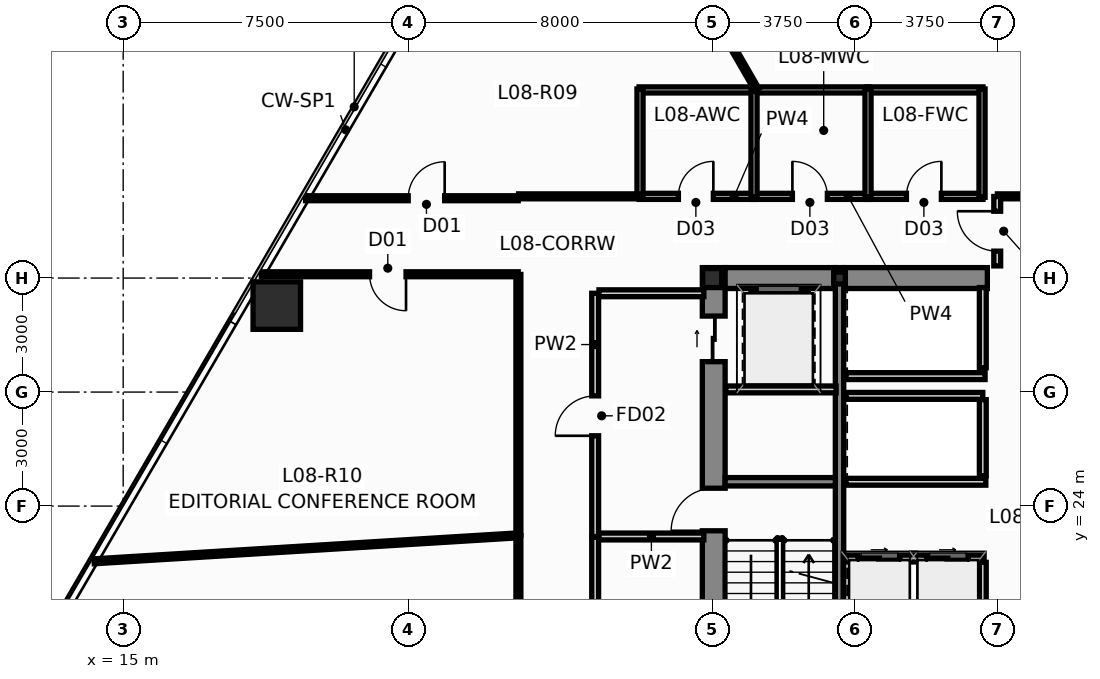
"""IFC4 building model, lengths in metres.
Left out: names, types, materials, properties, quantities, classifications, styles, units other than length and angle.
Written with IfcOpenShell. Run it as: python <this file> out.ifc"""

import sys

from ifc_helpers import new_model, si_unit, direction, frame, frame_2d, origin, origin_2d, place, context, subcontext, project, spatial, rectangle, hollow_rectangle, i_section, extrude, source, transform, mapped, element, fill, save


model = new_model("IFC4")
c1 = context("Model", 3, precision=1e-05, world=origin(), true_north=direction((0.0, 1.0)))
c2 = subcontext(c1, "Body", "Model", "MODEL_VIEW")
j1 = project(units=[si_unit("LENGTHUNIT", "METRE"), si_unit("PLANEANGLEUNIT", "RADIAN")], contexts=[c1])
p1 = place(None, origin())
s1 = spatial("IfcSite", under=j1, at=p1, CompositionType="ELEMENT")
p2 = place(p1, origin())
s2 = spatial("IfcBuilding", under=s1, at=p2, CompositionType="ELEMENT")
p3 = place(p2, frame((0.0, 0.0, 34.9)))
s3 = spatial("IfcBuildingStorey", under=s2, at=p3, CompositionType="ELEMENT", Elevation=34.9)
m1 = source(origin(), c2, "Body", "SweptSolid", [
    extrude(i_section(OverallWidth=0.5, OverallDepth=0.5, WebThickness=0.028, FlangeThickness=0.04, at=origin_2d()), origin(), (0.0, 0.0, 1.0), 3.65),
])
p4 = place(p3, frame((30.5, 30.0, 0.0), z_axis=(0.0, 0.0, 1.0), x_axis=(1.0, 0.0, 0.0)))
e1 = element("IfcColumn", 1, at=p4, inside=s3, PredefinedType="COLUMN", context=c2, shape_type="MappedRepresentation", body=[
    mapped(m1, transform((0.0, 0.0, 0.0), scale=1.0)),
])
m2 = source(origin(), c2, "Body", "SweptSolid", [
    extrude(i_section(OverallWidth=0.307, OverallDepth=0.315, WebThickness=0.012, FlangeThickness=0.019, at=origin_2d()), origin(), (0.0, 0.0, 1.0), 3.65),
])
p5 = place(p3, frame((33.85, 30.0, 0.0), z_axis=(0.0, 0.0, 1.0), x_axis=(1.0, 0.0, 0.0)))
e2 = element("IfcColumn", 2, at=p5, inside=s3, PredefinedType="COLUMN", context=c2, shape_type="MappedRepresentation", body=[
    mapped(m2, transform((0.0, 0.0, 0.0), scale=1.0)),
])
p6 = place(p3, frame((30.54, 16.85, 0.0), z_axis=(0.0, 0.0, 1.0), x_axis=(0.0, 1.0, 0.0)))
e3 = element("IfcWall", 3, at=p6, inside=s3, PredefinedType="SHEAR", context=c2, shape_type="SweptSolid", body=[
    extrude(rectangle(XDim=13.425, YDim=0.6, at=frame_2d((6.712, 0.0))), origin(), (0.0, 0.0, 1.0), 3.65),
])
p7 = place(p6, frame((6.5, 0.0, 0.0)))
e4 = element("IfcOpeningElement", 4, at=p7, cuts=e3, PredefinedType="OPENING", context=c2, shape_type="SweptSolid", body=[
    extrude(rectangle(XDim=1.12, YDim=2.15, at=frame_2d((0.56, 1.075))), frame((0.0, 0.312, 0.0), z_axis=(0.0, -1.0, 0.0), x_axis=(1.0, 0.0, 0.0)), (0.0, 0.0, 1.0), 0.624),
])
p8 = place(p6, frame((10.95, 0.0, 0.0)))
e5 = element("IfcOpeningElement", 5, at=p8, cuts=e3, PredefinedType="OPENING", context=c2, shape_type="SweptSolid", body=[
    extrude(rectangle(XDim=1.2, YDim=2.2, at=frame_2d((0.6, 1.1))), frame((0.0, 0.312, 0.0), z_axis=(0.0, -1.0, 0.0), x_axis=(1.0, 0.0, 0.0)), (0.0, 0.0, 1.0), 0.624),
])
p9 = place(p3, frame((30.84, 30.0, 0.0), z_axis=(0.0, 0.0, 1.0), x_axis=(1.0, 0.0, 0.0)))
e6 = element("IfcWall", 6, at=p9, inside=s3, PredefinedType="SHEAR", context=c2, shape_type="SweptSolid", body=[
    extrude(rectangle(XDim=2.9, YDim=0.55, at=frame_2d((1.45, 0.0))), origin(), (0.0, 0.0, 1.0), 3.65),
])
p10 = place(p3, frame((33.96, 30.0, 0.0), z_axis=(0.0, 0.0, 1.0), x_axis=(1.0, 0.0, 0.0)))
e7 = element("IfcWall", 7, at=p10, inside=s3, PredefinedType="SHEAR", context=c2, shape_type="SweptSolid", body=[
    extrude(rectangle(XDim=3.78, YDim=0.55, at=frame_2d((1.89, 0.0))), origin(), (0.0, 0.0, 1.0), 3.65),
])
p11 = place(p3, frame((33.85, 16.85, 0.0), z_axis=(0.0, 0.0, 1.0), x_axis=(0.0, 1.0, 0.0)))
e8 = element("IfcWall", 8, at=p11, inside=s3, PredefinedType="SHEAR", context=c2, shape_type="SweptSolid", body=[
    extrude(rectangle(XDim=13.425, YDim=0.22, at=frame_2d((6.712, 0.0))), origin(), (0.0, 0.0, 1.0), 3.65),
])
p12 = place(p3, frame((30.84, 24.64, 0.0), z_axis=(0.0, 0.0, 1.0), x_axis=(1.0, 0.0, 0.0)))
e9 = element("IfcWall", 9, at=p12, inside=s3, PredefinedType="SHEAR", context=c2, shape_type="SweptSolid", body=[
    extrude(rectangle(XDim=2.9, YDim=0.22, at=frame_2d((1.45, 0.0))), origin(), (0.0, 0.0, 1.0), 3.65),
])
m3 = source(origin(), c2, "Body", "SweptSolid", [
    extrude(hollow_rectangle(XDim=1.25, YDim=1.25, WallThickness=0.07, at=origin_2d()), origin(), (0.0, 0.0, 1.0), 3.651),
])
p13 = place(p3, frame((19.042, 29.275, 0.0), z_axis=(0.014845459728, -0.013775516685, 0.9997949027), x_axis=(0.68019775991, 0.733028653883, 0.0)))
e10 = element("IfcColumn", 10, at=p13, inside=s3, PredefinedType="COLUMN", context=c2, shape_type="MappedRepresentation", body=[
    mapped(m3, transform((0.0, 0.0, 0.0), scale=1.0)),
])
m4 = source(origin(), c2, "Body", "SweptSolid", [
    extrude(hollow_rectangle(XDim=1.25, YDim=1.25, WallThickness=0.07, at=origin_2d()), origin(), (0.0, 0.0, 1.0), 3.651),
])
p14 = place(p3, frame((14.132, 20.771, 0.0), z_axis=(0.010431098089, -0.021530856313, 0.999713766245), x_axis=(0.899947055326, 0.435999194506, 0.0)))
e11 = element("IfcColumn", 11, at=p14, inside=s3, PredefinedType="COLUMN", context=c2, shape_type="MappedRepresentation", body=[
    mapped(m4, transform((0.0, 0.0, 0.0), scale=1.0)),
])
p15 = place(p3, frame((34.02, 22.62, 0.0), z_axis=(0.0, 0.0, 1.0), x_axis=(1.0, 0.0, 0.0)))
e12 = element("IfcWall", 12, at=p15, inside=s3, PredefinedType="PARTITIONING", context=c2, shape_type="SweptSolid", body=[
    extrude(rectangle(XDim=3.6, YDim=0.18, at=frame_2d((1.8, 0.0))), origin(), (0.0, 0.0, 1.0), 3.4),
])
p16 = place(p15, frame((0.32, 0.0, 0.0)))
e13 = element("IfcOpeningElement", 13, at=p16, cuts=e12, PredefinedType="OPENING", context=c2, shape_type="SweptSolid", body=[
    extrude(rectangle(XDim=1.1, YDim=2.2, at=frame_2d((0.55, 1.1))), frame((0.0, 0.102, 0.0), z_axis=(0.0, -1.0, 0.0), x_axis=(1.0, 0.0, 0.0)), (0.0, 0.0, 1.0), 0.204),
])
p17 = place(p15, frame((2.12, 0.0, 0.0)))
e14 = element("IfcOpeningElement", 14, at=p17, cuts=e12, PredefinedType="OPENING", context=c2, shape_type="SweptSolid", body=[
    extrude(rectangle(XDim=1.1, YDim=2.2, at=frame_2d((0.55, 1.1))), frame((0.0, 0.102, 0.0), z_axis=(0.0, -1.0, 0.0), x_axis=(1.0, 0.0, 0.0)), (0.0, 0.0, 1.0), 0.204),
])
p18 = place(p3, frame((37.62, 20.52, 0.0), z_axis=(0.0, 0.0, 1.0), x_axis=(0.0, 1.0, 0.0)))
e15 = element("IfcWall", 15, at=p18, inside=s3, PredefinedType="PARTITIONING", context=c2, shape_type="SweptSolid", body=[
    extrude(rectangle(XDim=2.0, YDim=0.18, at=frame_2d((1.0, 0.0))), origin(), (0.0, 0.0, 1.0), 3.4),
])
p19 = place(p3, frame((34.02, 26.9, 0.0), z_axis=(0.0, 0.0, 1.0), x_axis=(1.0, 0.0, 0.0)))
e16 = element("IfcWall", 16, at=p19, inside=s3, PredefinedType="PARTITIONING", context=c2, shape_type="SweptSolid", body=[
    extrude(rectangle(XDim=3.6, YDim=0.18, at=frame_2d((1.8, 0.0))), origin(), (0.0, 0.0, 1.0), 3.4),
])
p20 = place(p3, frame((37.62, 24.8, 0.0), z_axis=(0.0, 0.0, 1.0), x_axis=(0.0, 1.0, 0.0)))
e17 = element("IfcWall", 17, at=p20, inside=s3, PredefinedType="PARTITIONING", context=c2, shape_type="SweptSolid", body=[
    extrude(rectangle(XDim=2.0, YDim=0.18, at=frame_2d((1.0, 0.0))), origin(), (0.0, 0.0, 1.0), 3.4),
])
p21 = place(p3, frame((34.02, 24.64, 0.0), z_axis=(0.0, 0.0, 1.0), x_axis=(1.0, 0.0, 0.0)))
e18 = element("IfcWall", 18, at=p21, inside=s3, PredefinedType="PARTITIONING", context=c2, shape_type="SweptSolid", body=[
    extrude(rectangle(XDim=3.68, YDim=0.18, at=frame_2d((1.84, 0.0))), origin(), (0.0, 0.0, 1.0), 3.4),
])
p22 = place(p3, frame((34.02, 27.42, 0.0), z_axis=(0.0, 0.0, 1.0), x_axis=(1.0, 0.0, 0.0)))
e19 = element("IfcWall", 19, at=p22, inside=s3, PredefinedType="PARTITIONING", context=c2, shape_type="SweptSolid", body=[
    extrude(rectangle(XDim=3.66, YDim=0.18, at=frame_2d((1.83, 0.0))), origin(), (0.0, 0.0, 1.0), 3.4),
])
p23 = place(p3, frame((37.62, 27.64, 0.0), z_axis=(0.0, 0.0, 1.0), x_axis=(0.0, 1.0, 0.0)))
e20 = element("IfcWall", 20, at=p23, inside=s3, PredefinedType="PARTITIONING", context=c2, shape_type="SweptSolid", body=[
    extrude(rectangle(XDim=2.11, YDim=0.18, at=frame_2d((1.055, 0.0))), origin(), (0.0, 0.0, 1.0), 3.4),
])
p24 = place(p3, frame((27.42, 23.2, 0.0), z_axis=(0.0, 0.0, 1.0), x_axis=(0.0, 1.0, 0.0)))
e21 = element("IfcWall", 21, at=p24, inside=s3, PredefinedType="PARTITIONING", context=c2, shape_type="SweptSolid", body=[
    extrude(rectangle(XDim=6.4, YDim=0.18, at=frame_2d((3.2, 0.0))), origin(), (0.0, 0.0, 1.0), 3.4),
])
p25 = place(p24, frame((2.65, 0.0, 0.0)))
e22 = element("IfcOpeningElement", 22, at=p25, cuts=e21, PredefinedType="OPENING", context=c2, shape_type="SweptSolid", body=[
    extrude(rectangle(XDim=1.05, YDim=2.15, at=frame_2d((0.525, 1.075))), frame((0.0, 0.102, 0.0), z_axis=(0.0, -1.0, 0.0), x_axis=(1.0, 0.0, 0.0)), (0.0, 0.0, 1.0), 0.204),
])
p26 = place(p3, frame((27.52, 23.2, 0.0), z_axis=(0.0, 0.0, 1.0), x_axis=(1.0, 0.0, 0.0)))
e23 = element("IfcWall", 23, at=p26, inside=s3, PredefinedType="PARTITIONING", context=c2, shape_type="SweptSolid", body=[
    extrude(rectangle(XDim=2.76, YDim=0.18, at=frame_2d((1.38, 0.0))), origin(), (0.0, 0.0, 1.0), 3.4),
])
p27 = place(p3, frame((27.52, 29.6, 0.0), z_axis=(0.0, 0.0, 1.0), x_axis=(1.0, 0.0, 0.0)))
e24 = element("IfcWall", 24, at=p27, inside=s3, PredefinedType="PARTITIONING", context=c2, shape_type="SweptSolid", body=[
    extrude(rectangle(XDim=2.76, YDim=0.18, at=frame_2d((1.38, 0.0))), origin(), (0.0, 0.0, 1.0), 2.783),
])
p28 = place(p3, frame((30.86, 27.07, 0.0), z_axis=(0.0, 0.0, 1.0), x_axis=(1.0, 0.0, 0.0)))
e25 = element("IfcWall", 25, at=p28, inside=s3, PredefinedType="PARTITIONING", context=c2, shape_type="SweptSolid", body=[
    extrude(rectangle(XDim=2.9, YDim=0.18, at=frame_2d((1.45, 0.0))), origin(), (0.0, 0.0, 1.0), 3.4),
])
p29 = place(p3, frame((27.42, 17.15, 0.0), z_axis=(0.0, 0.0, 1.0), x_axis=(0.0, 1.0, 0.0)))
e26 = element("IfcWall", 26, at=p29, inside=s3, PredefinedType="PARTITIONING", context=c2, shape_type="SweptSolid", body=[
    extrude(rectangle(XDim=6.03, YDim=0.18, at=frame_2d((3.015, 0.0))), origin(), (0.0, 0.0, 1.0), 3.027),
])
p30 = place(p29, frame((2.45, 0.0, 0.0)))
e27 = element("IfcOpeningElement", 27, at=p30, cuts=e26, PredefinedType="OPENING", context=c2, shape_type="SweptSolid", body=[
    extrude(rectangle(XDim=1.05, YDim=2.15, at=frame_2d((0.525, 1.075))), frame((0.0, 0.102, 0.0), z_axis=(0.0, -1.0, 0.0), x_axis=(1.0, 0.0, 0.0)), (0.0, 0.0, 1.0), 0.204),
])
p31 = place(p3, frame((28.575, 32.15, 0.0), z_axis=(0.0, 0.0, 1.0), x_axis=(1.0, 0.0, 0.0)))
e28 = element("IfcWall", 28, at=p31, inside=s3, PredefinedType="PLUMBINGWALL", context=c2, shape_type="SweptSolid", body=[
    extrude(rectangle(XDim=3.05, YDim=0.16, at=frame_2d((1.525, 0.0))), origin(), (0.0, 0.0, 1.0), 3.4),
])
p32 = place(p31, frame((1.035, 0.0, 0.0)))
e29 = element("IfcOpeningElement", 29, at=p32, cuts=e28, PredefinedType="OPENING", context=c2, shape_type="SweptSolid", body=[
    extrude(rectangle(XDim=0.92, YDim=2.1, at=frame_2d((0.46, 1.05))), frame((0.0, 0.092, 0.0), z_axis=(0.0, -1.0, 0.0), x_axis=(1.0, 0.0, 0.0)), (0.0, 0.0, 1.0), 0.184),
])
p33 = place(p3, frame((31.575, 32.15, 0.0), z_axis=(0.0, 0.0, 1.0), x_axis=(1.0, 0.0, 0.0)))
e30 = element("IfcWall", 30, at=p33, inside=s3, PredefinedType="PLUMBINGWALL", context=c2, shape_type="SweptSolid", body=[
    extrude(rectangle(XDim=3.05, YDim=0.16, at=frame_2d((1.525, 0.0))), origin(), (0.0, 0.0, 1.0), 3.4),
])
p34 = place(p33, frame((1.035, 0.0, 0.0)))
e31 = element("IfcOpeningElement", 31, at=p34, cuts=e30, PredefinedType="OPENING", context=c2, shape_type="SweptSolid", body=[
    extrude(rectangle(XDim=0.92, YDim=2.1, at=frame_2d((0.46, 1.05))), frame((0.0, 0.092, 0.0), z_axis=(0.0, -1.0, 0.0), x_axis=(1.0, 0.0, 0.0)), (0.0, 0.0, 1.0), 0.184),
])
p35 = place(p3, frame((34.575, 32.15, 0.0), z_axis=(0.0, 0.0, 1.0), x_axis=(1.0, 0.0, 0.0)))
e32 = element("IfcWall", 32, at=p35, inside=s3, PredefinedType="PLUMBINGWALL", context=c2, shape_type="SweptSolid", body=[
    extrude(rectangle(XDim=3.05, YDim=0.16, at=frame_2d((1.525, 0.0))), origin(), (0.0, 0.0, 1.0), 3.4),
])
p36 = place(p35, frame((1.035, 0.0, 0.0)))
e33 = element("IfcOpeningElement", 33, at=p36, cuts=e32, PredefinedType="OPENING", context=c2, shape_type="SweptSolid", body=[
    extrude(rectangle(XDim=0.92, YDim=2.1, at=frame_2d((0.46, 1.05))), frame((0.0, 0.092, 0.0), z_axis=(0.0, -1.0, 0.0), x_axis=(1.0, 0.0, 0.0)), (0.0, 0.0, 1.0), 0.184),
])
for number, where, z_axis, x_axis in (
    (34, (28.575, 34.95, 0.0), (0.0, 0.0, 1.0), (1.0, 0.0, 0.0)),
    (35, (37.625, 34.95, 0.0), (0.0, 0.0, 1.0), (-1.0, 0.0, 0.0)),
):
    element("IfcWall", number, at=place(p3, frame(where, z_axis=z_axis, x_axis=x_axis)), inside=s3, PredefinedType="PLUMBINGWALL", context=c2, shape_type="SweptSolid", body=[
        extrude(rectangle(XDim=3.05, YDim=0.16, at=frame_2d((1.525, 0.0))), origin(), (0.0, 0.0, 1.0), 3.027),
    ])
p37 = place(p3, frame((31.655, 34.95, 0.0), z_axis=(0.0, 0.0, 1.0), x_axis=(1.0, 0.0, 0.0)))
e36 = element("IfcWall", 36, at=p37, inside=s3, PredefinedType="PLUMBINGWALL", context=c2, shape_type="SweptSolid", body=[
    extrude(rectangle(XDim=2.97, YDim=0.16, at=frame_2d((1.485, 0.0))), origin(), (0.0, 0.0, 1.0), 3.027),
])
for number, where, z_axis, x_axis in (
    (37, (31.6, 32.125, 0.0), (0.0, 0.0, 1.0), (0.0, 1.0, 0.0)),
    (38, (28.6, 32.125, 0.0), (0.0, 0.0, 1.0), (0.0, 1.0, 0.0)),
    (39, (34.6, 32.125, 0.0), (0.0, 0.0, 1.0), (0.0, 1.0, 0.0)),
    (40, (37.6, 32.125, 0.0), (0.0, 0.0, 1.0), (0.0, 1.0, 0.0)),
):
    element("IfcWall", number, at=place(p3, frame(where, z_axis=z_axis, x_axis=x_axis)), inside=s3, PredefinedType="PLUMBINGWALL", context=c2, shape_type="SweptSolid", body=[
        extrude(rectangle(XDim=2.85, YDim=0.16, at=frame_2d((1.425, 0.0))), origin(), (0.0, 0.0, 1.0), 3.4),
    ])
p38 = place(p3, frame((14.236, 22.547, 0.0), z_axis=(0.0, 0.0, 1.0), x_axis=(0.998132881606, 0.061079871132, 0.0)))
e41 = element("IfcWall", 41, at=p38, inside=s3, PredefinedType="PARTITIONING", context=c2, shape_type="SweptSolid", body=[
    extrude(rectangle(XDim=11.18, YDim=0.13, at=frame_2d((5.59, 0.0))), origin(), (0.0, 0.0, 1.0), 3.4),
])
p39 = place(p3, frame((26.592, 43.76, 0.0), z_axis=(0.0, 0.0, 1.0), x_axis=(0.500061190887, -0.865990072327, 0.0)))
e42 = element("IfcWall", 42, at=p39, inside=s3, PredefinedType="PARTITIONING", context=c2, shape_type="SweptSolid", body=[
    extrude(rectangle(XDim=10.169, YDim=0.13, at=frame_2d((5.084, 0.0))), origin(), (0.0, 0.0, 1.0), 3.4),
])
p40 = place(p3, frame((25.4, 23.235, 0.0), z_axis=(0.0, 0.0, 1.0), x_axis=(0.0, 1.0, 0.0)))
e43 = element("IfcWall", 43, at=p40, inside=s3, PredefinedType="PARTITIONING", context=c2, shape_type="SweptSolid", body=[
    extrude(rectangle(XDim=6.86, YDim=0.13, at=frame_2d((3.43, 0.0))), origin(), (0.0, 0.0, 1.0), 3.027),
])
p41 = place(p3, frame((25.395, 30.1, 0.0), z_axis=(0.0, 0.0, 1.0), x_axis=(-1.0, 0.0, 0.0)))
e44 = element("IfcWall", 44, at=p41, inside=s3, PredefinedType="PARTITIONING", context=c2, shape_type="SweptSolid", body=[
    extrude(rectangle(XDim=6.76, YDim=0.13, at=frame_2d((3.38, 0.0))), origin(), (0.0, 0.0, 1.0), 2.783),
])
p42 = place(p41, frame((2.952, 0.0, 0.0)))
e45 = element("IfcOpeningElement", 45, at=p42, cuts=e44, PredefinedType="OPENING", context=c2, shape_type="SweptSolid", body=[
    extrude(rectangle(XDim=0.96, YDim=2.15, at=frame_2d((0.48, 1.075))), frame((0.0, 0.077, 0.0), z_axis=(0.0, -1.0, 0.0), x_axis=(1.0, 0.0, 0.0)), (0.0, 0.0, 1.0), 0.154),
])
p43 = place(p3, frame((25.4, 17.105, 0.0), z_axis=(0.0, 0.0, 1.0), x_axis=(0.0, 1.0, 0.0)))
e46 = element("IfcWall", 46, at=p43, inside=s3, PredefinedType="PARTITIONING", context=c2, shape_type="SweptSolid", body=[
    extrude(rectangle(XDim=6.12, YDim=0.13, at=frame_2d((3.06, 0.0))), origin(), (0.0, 0.0, 1.0), 3.027),
])
p44 = place(p3, frame((19.8, 32.1, 0.0), z_axis=(0.0, 0.0, 1.0), x_axis=(1.0, 0.0, 0.0)))
e47 = element("IfcWall", 47, at=p44, inside=s3, PredefinedType="PARTITIONING", context=c2, shape_type="SweptSolid", body=[
    extrude(rectangle(XDim=5.595, YDim=0.13, at=frame_2d((2.797, 0.0))), origin(), (0.0, 0.0, 1.0), 3.4),
])
p45 = place(p44, frame((2.7, 0.0, 0.0)))
e48 = element("IfcOpeningElement", 48, at=p45, cuts=e47, PredefinedType="OPENING", context=c2, shape_type="SweptSolid", body=[
    extrude(rectangle(XDim=0.96, YDim=2.15, at=frame_2d((0.48, 1.075))), frame((0.0, 0.077, 0.0), z_axis=(0.0, -1.0, 0.0), x_axis=(1.0, 0.0, 0.0)), (0.0, 0.0, 1.0), 0.154),
])
p46 = place(p3, frame((38.005, 32.15, 0.0), z_axis=(0.0, 0.0, 1.0), x_axis=(1.0, 0.0, 0.0)))
e49 = element("IfcWall", 49, at=p46, inside=s3, PredefinedType="PARTITIONING", context=c2, shape_type="SweptSolid", body=[
    extrude(rectangle(XDim=4.05, YDim=0.13, at=frame_2d((2.025, 0.0))), origin(), (0.0, 0.0, 1.0), 3.4),
])
p47 = place(p46, frame((1.545, 0.0, 0.0)))
e50 = element("IfcOpeningElement", 50, at=p47, cuts=e49, PredefinedType="OPENING", context=c2, shape_type="SweptSolid", body=[
    extrude(rectangle(XDim=0.96, YDim=2.15, at=frame_2d((0.48, 1.075))), frame((0.0, 0.077, 0.0), z_axis=(0.0, -1.0, 0.0), x_axis=(1.0, 0.0, 0.0)), (0.0, 0.0, 1.0), 0.154),
])
p48 = place(p3, frame((25.405, 32.15, 0.0), z_axis=(0.0, 0.0, 1.0), x_axis=(1.0, 0.0, 0.0)))
e51 = element("IfcWall", 51, at=p48, inside=s3, PredefinedType="PARTITIONING", context=c2, shape_type="SweptSolid", body=[
    extrude(rectangle(XDim=3.19, YDim=0.13, at=frame_2d((1.595, 0.0))), origin(), (0.0, 0.0, 1.0), 3.4),
])
p49 = place(p3, frame((38.0, 30.32, 0.0), z_axis=(0.0, 0.0, 1.0), x_axis=(0.0, 1.0, 0.0)))
e52 = element("IfcWall", 52, at=p49, inside=s3, PredefinedType="PARTITIONING", context=c2, shape_type="SweptSolid", body=[
    extrude(rectangle(XDim=1.825, YDim=0.18, at=frame_2d((0.913, 0.0))), origin(), (0.0, 0.0, 1.0), 3.4),
])
p50 = place(p49, frame((0.388, 0.0, 0.0)))
e53 = element("IfcOpeningElement", 53, at=p50, cuts=e52, PredefinedType="OPENING", context=c2, shape_type="SweptSolid", body=[
    extrude(rectangle(XDim=1.05, YDim=2.15, at=frame_2d((0.525, 1.075))), frame((0.0, 0.102, 0.0), z_axis=(0.0, -1.0, 0.0), x_axis=(1.0, 0.0, 0.0)), (0.0, 0.0, 1.0), 0.204),
])
p51 = place(p7, origin())
e54 = element("IfcDoor", 54, at=p51, inside=s3, OperationType="SINGLE_SWING_LEFT", PredefinedType="DOOR", context=c2, shape_type="SweptSolid", body=[
    extrude(rectangle(XDim=1.12, YDim=2.15, at=frame_2d((0.56, 1.075))), frame((0.0, 0.025, 0.0), z_axis=(0.0, -1.0, 0.0), x_axis=(1.0, 0.0, 0.0)), (0.0, 0.0, 1.0), 0.05),
])
fill(e4, e54)
p52 = place(p8, origin())
e55 = element("IfcDoor", 55, at=p52, inside=s3, OperationType="SLIDING_TO_LEFT", PredefinedType="DOOR", context=c2, shape_type="SweptSolid", body=[
    extrude(rectangle(XDim=1.2, YDim=2.2, at=frame_2d((0.6, 1.1))), frame((0.0, 0.025, 0.0), z_axis=(0.0, -1.0, 0.0), x_axis=(1.0, 0.0, 0.0)), (0.0, 0.0, 1.0), 0.05),
])
fill(e5, e55)
p53 = place(p16, origin())
e56 = element("IfcDoor", 56, at=p53, inside=s3, OperationType="SLIDING_TO_LEFT", PredefinedType="DOOR", context=c2, shape_type="SweptSolid", body=[
    extrude(rectangle(XDim=1.1, YDim=2.2, at=frame_2d((0.55, 1.1))), frame((0.0, 0.025, 0.0), z_axis=(0.0, -1.0, 0.0), x_axis=(1.0, 0.0, 0.0)), (0.0, 0.0, 1.0), 0.05),
])
fill(e13, e56)
p54 = place(p17, origin())
e57 = element("IfcDoor", 57, at=p54, inside=s3, OperationType="SLIDING_TO_RIGHT", PredefinedType="DOOR", context=c2, shape_type="SweptSolid", body=[
    extrude(rectangle(XDim=1.1, YDim=2.2, at=frame_2d((0.55, 1.1))), frame((0.0, 0.025, 0.0), z_axis=(0.0, -1.0, 0.0), x_axis=(1.0, 0.0, 0.0)), (0.0, 0.0, 1.0), 0.05),
])
fill(e14, e57)
p55 = place(p25, origin())
e58 = element("IfcDoor", 58, at=p55, inside=s3, OperationType="SINGLE_SWING_LEFT", PredefinedType="DOOR", context=c2, shape_type="SweptSolid", body=[
    extrude(rectangle(XDim=1.05, YDim=2.15, at=frame_2d((0.525, 1.075))), frame((0.0, 0.025, 0.0), z_axis=(0.0, -1.0, 0.0), x_axis=(1.0, 0.0, 0.0)), (0.0, 0.0, 1.0), 0.05),
])
fill(e22, e58)
p56 = place(p32, origin())
e59 = element("IfcDoor", 59, at=p56, inside=s3, OperationType="SINGLE_SWING_RIGHT", PredefinedType="DOOR", context=c2, shape_type="SweptSolid", body=[
    extrude(rectangle(XDim=0.92, YDim=2.1, at=frame_2d((0.46, 1.05))), frame((0.0, 0.025, 0.0), z_axis=(0.0, -1.0, 0.0), x_axis=(1.0, 0.0, 0.0)), (0.0, 0.0, 1.0), 0.05),
])
fill(e29, e59)
p57 = place(p34, origin())
e60 = element("IfcDoor", 60, at=p57, inside=s3, OperationType="SINGLE_SWING_LEFT", PredefinedType="DOOR", context=c2, shape_type="SweptSolid", body=[
    extrude(rectangle(XDim=0.92, YDim=2.1, at=frame_2d((0.46, 1.05))), frame((0.0, 0.025, 0.0), z_axis=(0.0, -1.0, 0.0), x_axis=(1.0, 0.0, 0.0)), (0.0, 0.0, 1.0), 0.05),
])
fill(e31, e60)
p58 = place(p36, origin())
e61 = element("IfcDoor", 61, at=p58, inside=s3, OperationType="SINGLE_SWING_RIGHT", PredefinedType="DOOR", context=c2, shape_type="SweptSolid", body=[
    extrude(rectangle(XDim=0.92, YDim=2.1, at=frame_2d((0.46, 1.05))), frame((0.0, 0.025, 0.0), z_axis=(0.0, -1.0, 0.0), x_axis=(1.0, 0.0, 0.0)), (0.0, 0.0, 1.0), 0.05),
])
fill(e33, e61)
p59 = place(p42, origin())
e62 = element("IfcDoor", 62, at=p59, inside=s3, OperationType="SINGLE_SWING_LEFT", PredefinedType="DOOR", context=c2, shape_type="SweptSolid", body=[
    extrude(rectangle(XDim=0.96, YDim=2.15, at=frame_2d((0.48, 1.075))), frame((0.0, 0.025, 0.0), z_axis=(0.0, -1.0, 0.0), x_axis=(1.0, 0.0, 0.0)), (0.0, 0.0, 1.0), 0.05),
])
fill(e45, e62)
p60 = place(p45, origin())
e63 = element("IfcDoor", 63, at=p60, inside=s3, OperationType="SINGLE_SWING_RIGHT", PredefinedType="DOOR", context=c2, shape_type="SweptSolid", body=[
    extrude(rectangle(XDim=0.96, YDim=2.15, at=frame_2d((0.48, 1.075))), frame((0.0, 0.025, 0.0), z_axis=(0.0, -1.0, 0.0), x_axis=(1.0, 0.0, 0.0)), (0.0, 0.0, 1.0), 0.05),
])
fill(e48, e63)
p61 = place(p50, origin())
e64 = element("IfcDoor", 64, at=p61, inside=s3, OperationType="SINGLE_SWING_RIGHT", PredefinedType="DOOR", context=c2, shape_type="SweptSolid", body=[
    extrude(rectangle(XDim=1.05, YDim=2.15, at=frame_2d((0.525, 1.075))), frame((0.0, 0.025, 0.0), z_axis=(0.0, -1.0, 0.0), x_axis=(1.0, 0.0, 0.0)), (0.0, 0.0, 1.0), 0.05),
])
fill(e53, e64)
save(model, sys.argv[1])
